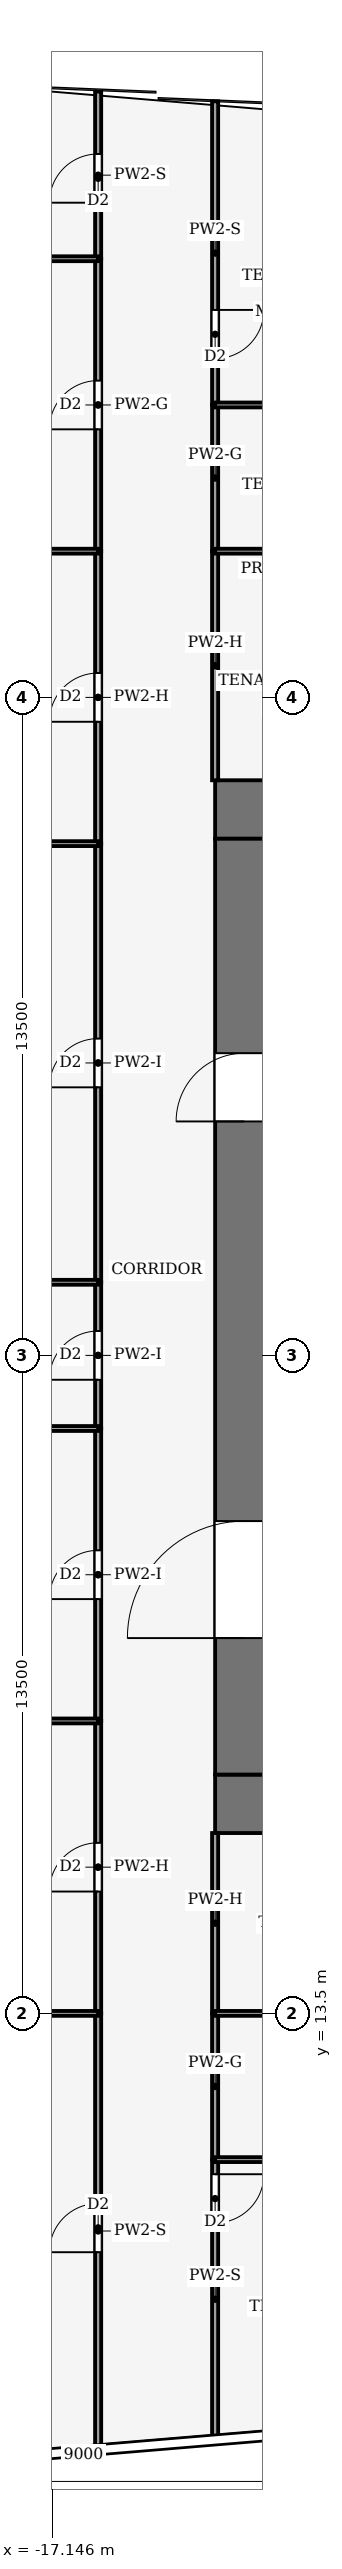
"""IFC4 building model, lengths in metres.
Left out: names, types, materials, properties, quantities, classifications, styles, units other than length and angle.
Written with IfcOpenShell. Run it as: python <this file> out.ifc"""

import sys

from ifc_helpers import new_model, si_unit, direction, frame, frame_2d, origin, place, context, subcontext, project, spatial, rectangle, extrude, element, fill, save


model = new_model("IFC4")
c1 = context("Model", 3, precision=1e-05, world=origin(), true_north=direction((0.0, 1.0)))
c2 = subcontext(c1, "Body", "Model", "MODEL_VIEW")
j1 = project(units=[si_unit("LENGTHUNIT", "METRE"), si_unit("PLANEANGLEUNIT", "RADIAN")], contexts=[c1])
p1 = place(None, origin())
s1 = spatial("IfcSite", under=j1, at=p1, CompositionType="ELEMENT")
p2 = place(p1, origin())
s2 = spatial("IfcBuilding", under=s1, at=p2, CompositionType="ELEMENT")
p3 = place(p2, frame((0.0, 0.0, 78.0)))
s3 = spatial("IfcBuildingStorey", under=s2, at=p3, CompositionType="ELEMENT", Elevation=78.0)
for number, where, z_axis, x_axis in (
    (1, (-13.8, 17.8, -0.13), (0.0, 0.0, 1.0), (1.0, 0.0, 0.0)),
    (2, (-13.8, 38.2, -0.13), (0.0, 0.0, 1.0), (1.0, 0.0, 0.0)),
):
    element("IfcWall", number, at=place(p3, frame(where, z_axis=z_axis, x_axis=x_axis)), inside=s3, PredefinedType="SHEAR", context=c2, shape_type="SweptSolid", body=[
        extrude(rectangle(XDim=27.6, YDim=1.2, at=frame_2d((13.8, 0.0))), origin(), (0.0, 0.0, 1.0), 4.0),
    ])
p4 = place(p3, frame((-13.2, 18.4, -0.13), z_axis=(0.0, 0.0, 1.0), x_axis=(0.0, 1.0, 0.0)))
e3 = element("IfcWall", 3, at=p4, inside=s3, PredefinedType="SHEAR", context=c2, shape_type="SweptSolid", body=[
    extrude(rectangle(XDim=19.2, YDim=1.2, at=frame_2d((9.6, 0.0))), origin(), (0.0, 0.0, 1.0), 4.0),
])
p5 = place(p4, frame((2.8, 0.0, 0.13)))
e4 = element("IfcOpeningElement", 4, at=p5, cuts=e3, PredefinedType="OPENING", context=c2, shape_type="SweptSolid", body=[
    extrude(rectangle(XDim=2.4, YDim=2.4, at=frame_2d((1.2, 1.2))), frame((0.0, 0.61, 0.0), z_axis=(0.0, -1.0, 0.0), x_axis=(1.0, 0.0, 0.0)), (0.0, 0.0, 1.0), 1.22),
])
p6 = place(p4, frame((13.4, 0.0, 0.13)))
e5 = element("IfcOpeningElement", 5, at=p6, cuts=e3, PredefinedType="OPENING", context=c2, shape_type="SweptSolid", body=[
    extrude(rectangle(XDim=1.4, YDim=2.2, at=frame_2d((0.7, 1.1))), frame((0.0, 0.61, 0.0), z_axis=(0.0, -1.0, 0.0), x_axis=(1.0, 0.0, 0.0)), (0.0, 0.0, 1.0), 1.22),
])
p7 = place(p3, frame((-16.2, 4.57, 0.0), z_axis=(0.0, 0.0, 1.0), x_axis=(0.0, 1.0, 0.0)))
e6 = element("IfcWall", 6, at=p7, inside=s3, PredefinedType="PARTITIONING", context=c2, shape_type="SweptSolid", body=[
    extrude(rectangle(XDim=8.93, YDim=0.125, at=frame_2d((4.465, 0.0))), origin(), (0.0, 0.0, 1.0), 3.04),
])
p8 = place(p7, frame((4.03, 0.0, 0.0)))
e7 = element("IfcOpeningElement", 7, at=p8, cuts=e6, PredefinedType="OPENING", context=c2, shape_type="SweptSolid", body=[
    extrude(rectangle(XDim=1.0, YDim=2.1, at=frame_2d((0.5, 1.05))), frame((0.0, 0.073, 0.0), z_axis=(0.0, -1.0, 0.0), x_axis=(1.0, 0.0, 0.0)), (0.0, 0.0, 1.0), 0.145),
])
p9 = place(p3, frame((-16.2, 13.5, 0.0), z_axis=(0.0, 0.0, 1.0), x_axis=(0.0, 1.0, 0.0)))
e8 = element("IfcWall", 8, at=p9, inside=s3, PredefinedType="PARTITIONING", context=c2, shape_type="SweptSolid", body=[
    extrude(rectangle(XDim=6.0, YDim=0.125, at=frame_2d((3.0, 0.0))), origin(), (0.0, 0.0, 1.0), 3.14),
])
p10 = place(p9, frame((2.5, 0.0, 0.0)))
e9 = element("IfcOpeningElement", 9, at=p10, cuts=e8, PredefinedType="OPENING", context=c2, shape_type="SweptSolid", body=[
    extrude(rectangle(XDim=1.0, YDim=2.1, at=frame_2d((0.5, 1.05))), frame((0.0, 0.073, 0.0), z_axis=(0.0, -1.0, 0.0), x_axis=(1.0, 0.0, 0.0)), (0.0, 0.0, 1.0), 0.145),
])
p11 = place(p3, frame((-16.2, 19.5, 0.0), z_axis=(0.0, 0.0, 1.0), x_axis=(0.0, 1.0, 0.0)))
e10 = element("IfcWall", 10, at=p11, inside=s3, PredefinedType="PARTITIONING", context=c2, shape_type="SweptSolid", body=[
    extrude(rectangle(XDim=6.0, YDim=0.125, at=frame_2d((3.0, 0.0))), origin(), (0.0, 0.0, 1.0), 3.48),
])
p12 = place(p11, frame((2.5, 0.0, 0.0)))
e11 = element("IfcOpeningElement", 11, at=p12, cuts=e10, PredefinedType="OPENING", context=c2, shape_type="SweptSolid", body=[
    extrude(rectangle(XDim=1.0, YDim=2.1, at=frame_2d((0.5, 1.05))), frame((0.0, 0.073, 0.0), z_axis=(0.0, -1.0, 0.0), x_axis=(1.0, 0.0, 0.0)), (0.0, 0.0, 1.0), 0.145),
])
p13 = place(p3, frame((-16.2, 25.5, 0.0), z_axis=(0.0, 0.0, 1.0), x_axis=(0.0, 1.0, 0.0)))
e12 = element("IfcWall", 12, at=p13, inside=s3, PredefinedType="PARTITIONING", context=c2, shape_type="SweptSolid", body=[
    extrude(rectangle(XDim=3.0, YDim=0.125, at=frame_2d((1.5, 0.0))), origin(), (0.0, 0.0, 1.0), 3.48),
])
p14 = place(p13, frame((1.0, 0.0, 0.0)))
e13 = element("IfcOpeningElement", 13, at=p14, cuts=e12, PredefinedType="OPENING", context=c2, shape_type="SweptSolid", body=[
    extrude(rectangle(XDim=1.0, YDim=2.1, at=frame_2d((0.5, 1.05))), frame((0.0, 0.073, 0.0), z_axis=(0.0, -1.0, 0.0), x_axis=(1.0, 0.0, 0.0)), (0.0, 0.0, 1.0), 0.145),
])
p15 = place(p3, frame((-16.2, 28.5, 0.0), z_axis=(0.0, 0.0, 1.0), x_axis=(0.0, 1.0, 0.0)))
e14 = element("IfcWall", 14, at=p15, inside=s3, PredefinedType="PARTITIONING", context=c2, shape_type="SweptSolid", body=[
    extrude(rectangle(XDim=9.0, YDim=0.125, at=frame_2d((4.5, 0.0))), origin(), (0.0, 0.0, 1.0), 3.48),
])
p16 = place(p15, frame((4.0, 0.0, 0.0)))
e15 = element("IfcOpeningElement", 15, at=p16, cuts=e14, PredefinedType="OPENING", context=c2, shape_type="SweptSolid", body=[
    extrude(rectangle(XDim=1.0, YDim=2.1, at=frame_2d((0.5, 1.05))), frame((0.0, 0.073, 0.0), z_axis=(0.0, -1.0, 0.0), x_axis=(1.0, 0.0, 0.0)), (0.0, 0.0, 1.0), 0.145),
])
p17 = place(p3, frame((-16.2, 37.5, 0.0), z_axis=(0.0, 0.0, 1.0), x_axis=(0.0, 1.0, 0.0)))
e16 = element("IfcWall", 16, at=p17, inside=s3, PredefinedType="PARTITIONING", context=c2, shape_type="SweptSolid", body=[
    extrude(rectangle(XDim=6.0, YDim=0.125, at=frame_2d((3.0, 0.0))), origin(), (0.0, 0.0, 1.0), 3.14),
])
p18 = place(p17, frame((2.5, 0.0, 0.0)))
e17 = element("IfcOpeningElement", 17, at=p18, cuts=e16, PredefinedType="OPENING", context=c2, shape_type="SweptSolid", body=[
    extrude(rectangle(XDim=1.0, YDim=2.1, at=frame_2d((0.5, 1.05))), frame((0.0, 0.073, 0.0), z_axis=(0.0, -1.0, 0.0), x_axis=(1.0, 0.0, 0.0)), (0.0, 0.0, 1.0), 0.145),
])
p19 = place(p3, frame((-16.2, 43.5, 0.0), z_axis=(0.0, 0.0, 1.0), x_axis=(0.0, 1.0, 0.0)))
e18 = element("IfcWall", 18, at=p19, inside=s3, PredefinedType="PARTITIONING", context=c2, shape_type="SweptSolid", body=[
    extrude(rectangle(XDim=6.0, YDim=0.125, at=frame_2d((3.0, 0.0))), origin(), (0.0, 0.0, 1.0), 3.87),
])
p20 = place(p19, frame((2.5, 0.0, 0.0)))
e19 = element("IfcOpeningElement", 19, at=p20, cuts=e18, PredefinedType="OPENING", context=c2, shape_type="SweptSolid", body=[
    extrude(rectangle(XDim=1.0, YDim=2.1, at=frame_2d((0.5, 1.05))), frame((0.0, 0.073, 0.0), z_axis=(0.0, -1.0, 0.0), x_axis=(1.0, 0.0, 0.0)), (0.0, 0.0, 1.0), 0.145),
])
p21 = place(p3, frame((-16.2, 49.5, 0.0), z_axis=(0.0, 0.0, 1.0), x_axis=(0.0, 1.0, 0.0)))
e20 = element("IfcWall", 20, at=p21, inside=s3, PredefinedType="PARTITIONING", context=c2, shape_type="SweptSolid", body=[
    extrude(rectangle(XDim=3.43, YDim=0.125, at=frame_2d((1.715, 0.0))), origin(), (0.0, 0.0, 1.0), 3.04),
])
p22 = place(p21, frame((1.15, 0.0, 0.0)))
e21 = element("IfcOpeningElement", 21, at=p22, cuts=e20, PredefinedType="OPENING", context=c2, shape_type="SweptSolid", body=[
    extrude(rectangle(XDim=1.0, YDim=2.1, at=frame_2d((0.5, 1.05))), frame((0.0, 0.073, 0.0), z_axis=(0.0, -1.0, 0.0), x_axis=(1.0, 0.0, 0.0)), (0.0, 0.0, 1.0), 0.145),
])
p23 = place(p3, frame((-13.8, 10.5, 0.0), z_axis=(0.0, 0.0, 1.0), x_axis=(0.0, -1.0, 0.0)))
e22 = element("IfcWall", 22, at=p23, inside=s3, PredefinedType="PARTITIONING", context=c2, shape_type="SweptSolid", body=[
    extrude(rectangle(XDim=5.73, YDim=0.125, at=frame_2d((2.865, 0.0))), origin(), (0.0, 0.0, 1.0), 3.04),
])
p24 = place(p23, frame((0.3, 0.0, 0.0)))
e23 = element("IfcOpeningElement", 23, at=p24, cuts=e22, PredefinedType="OPENING", context=c2, shape_type="SweptSolid", body=[
    extrude(rectangle(XDim=1.0, YDim=2.1, at=frame_2d((0.5, 1.05))), frame((0.0, 0.073, 0.0), z_axis=(0.0, -1.0, 0.0), x_axis=(1.0, 0.0, 0.0)), (0.0, 0.0, 1.0), 0.145),
])
p25 = place(p3, frame((-13.8, 10.5, 0.0), z_axis=(0.0, 0.0, 1.0), x_axis=(0.0, 1.0, 0.0)))
e24 = element("IfcWall", 24, at=p25, inside=s3, PredefinedType="PARTITIONING", context=c2, shape_type="SweptSolid", body=[
    extrude(rectangle(XDim=3.0, YDim=0.125, at=frame_2d((1.5, 0.0))), origin(), (0.0, 0.0, 1.0), 3.87),
])
p26 = place(p3, frame((-13.8, 13.5, 0.0), z_axis=(0.0, 0.0, 1.0), x_axis=(0.0, 1.0, 0.0)))
e25 = element("IfcWall", 25, at=p26, inside=s3, PredefinedType="PARTITIONING", context=c2, shape_type="SweptSolid", body=[
    extrude(rectangle(XDim=3.7, YDim=0.125, at=frame_2d((1.85, 0.0))), origin(), (0.0, 0.0, 1.0), 3.14),
])
p27 = place(p3, frame((-13.8, 38.8, 0.0), z_axis=(0.0, 0.0, 1.0), x_axis=(0.0, 1.0, 0.0)))
e26 = element("IfcWall", 26, at=p27, inside=s3, PredefinedType="PARTITIONING", context=c2, shape_type="SweptSolid", body=[
    extrude(rectangle(XDim=4.7, YDim=0.125, at=frame_2d((2.35, 0.0))), origin(), (0.0, 0.0, 1.0), 3.14),
])
p28 = place(p3, frame((-13.8, 43.5, 0.0), z_axis=(0.0, 0.0, 1.0), x_axis=(0.0, 1.0, 0.0)))
e27 = element("IfcWall", 27, at=p28, inside=s3, PredefinedType="PARTITIONING", context=c2, shape_type="SweptSolid", body=[
    extrude(rectangle(XDim=3.0, YDim=0.125, at=frame_2d((1.5, 0.0))), origin(), (0.0, 0.0, 1.0), 3.87),
])
p29 = place(p3, frame((-13.8, 52.73, 0.0), z_axis=(0.0, 0.0, 1.0), x_axis=(0.0, -1.0, 0.0)))
e28 = element("IfcWall", 28, at=p29, inside=s3, PredefinedType="PARTITIONING", context=c2, shape_type="SweptSolid", body=[
    extrude(rectangle(XDim=6.23, YDim=0.125, at=frame_2d((3.115, 0.0))), origin(), (0.0, 0.0, 1.0), 3.04),
])
p30 = place(p29, frame((4.28, 0.0, 0.0)))
e29 = element("IfcOpeningElement", 29, at=p30, cuts=e28, PredefinedType="OPENING", context=c2, shape_type="SweptSolid", body=[
    extrude(rectangle(XDim=1.0, YDim=2.1, at=frame_2d((0.5, 1.05))), frame((0.0, 0.073, 0.0), z_axis=(0.0, -1.0, 0.0), x_axis=(1.0, 0.0, 0.0)), (0.0, 0.0, 1.0), 0.145),
])
p31 = place(p3, frame((-16.2, 13.5, 0.0), z_axis=(0.0, 0.0, 1.0), x_axis=(-1.0, 0.0, 0.0)))
e30 = element("IfcWall", 30, at=p31, inside=s3, PredefinedType="PARTITIONING", context=c2, shape_type="SweptSolid", body=[
    extrude(rectangle(XDim=7.634, YDim=0.1, at=frame_2d((3.817, 0.0))), origin(), (0.0, 0.0, 1.0), 3.04),
])
p32 = place(p3, frame((-16.2, 19.5, 0.0), z_axis=(0.0, 0.0, 1.0), x_axis=(-1.0, 0.0, 0.0)))
e31 = element("IfcWall", 31, at=p32, inside=s3, PredefinedType="PARTITIONING", context=c2, shape_type="SweptSolid", body=[
    extrude(rectangle(XDim=7.14, YDim=0.1, at=frame_2d((3.57, 0.0))), origin(), (0.0, 0.0, 1.0), 3.04),
])
p33 = place(p3, frame((-16.2, 25.5, 0.0), z_axis=(0.0, 0.0, 1.0), x_axis=(-1.0, 0.0, 0.0)))
e32 = element("IfcWall", 32, at=p33, inside=s3, PredefinedType="PARTITIONING", context=c2, shape_type="SweptSolid", body=[
    extrude(rectangle(XDim=6.647, YDim=0.1, at=frame_2d((3.324, 0.0))), origin(), (0.0, 0.0, 1.0), 3.04),
])
p34 = place(p3, frame((-16.2, 28.5, 0.0), z_axis=(0.0, 0.0, 1.0), x_axis=(-1.0, 0.0, 0.0)))
e33 = element("IfcWall", 33, at=p34, inside=s3, PredefinedType="PARTITIONING", context=c2, shape_type="SweptSolid", body=[
    extrude(rectangle(XDim=6.401, YDim=0.1, at=frame_2d((3.2, 0.0))), origin(), (0.0, 0.0, 1.0), 3.04),
])
p35 = place(p3, frame((-16.2, 37.5, 0.0), z_axis=(0.0, 0.0, 1.0), x_axis=(-1.0, 0.0, 0.0)))
e34 = element("IfcWall", 34, at=p35, inside=s3, PredefinedType="PARTITIONING", context=c2, shape_type="SweptSolid", body=[
    extrude(rectangle(XDim=7.099, YDim=0.1, at=frame_2d((3.55, 0.0))), origin(), (0.0, 0.0, 1.0), 3.04),
])
p36 = place(p3, frame((-16.2, 43.5, 0.0), z_axis=(0.0, 0.0, 1.0), x_axis=(-1.0, 0.0, 0.0)))
e35 = element("IfcWall", 35, at=p36, inside=s3, PredefinedType="PARTITIONING", context=c2, shape_type="SweptSolid", body=[
    extrude(rectangle(XDim=7.592, YDim=0.1, at=frame_2d((3.796, 0.0))), origin(), (0.0, 0.0, 1.0), 3.04),
])
p37 = place(p3, frame((-16.2, 49.5, 0.0), z_axis=(0.0, 0.0, 1.0), x_axis=(-1.0, 0.0, 0.0)))
e36 = element("IfcWall", 36, at=p37, inside=s3, PredefinedType="PARTITIONING", context=c2, shape_type="SweptSolid", body=[
    extrude(rectangle(XDim=7.287, YDim=0.1, at=frame_2d((3.644, 0.0))), origin(), (0.0, 0.0, 1.0), 3.34),
])
p38 = place(p3, frame((-13.8, 10.5, 0.0), z_axis=(0.0, 0.0, 1.0), x_axis=(1.0, 0.0, 0.0)))
e37 = element("IfcWall", 37, at=p38, inside=s3, PredefinedType="PARTITIONING", context=c2, shape_type="SweptSolid", body=[
    extrude(rectangle(XDim=6.3, YDim=0.1, at=frame_2d((3.15, 0.0))), origin(), (0.0, 0.0, 1.0), 3.39),
])
p39 = place(p38, frame((2.65, 0.0, 0.0)))
e38 = element("IfcOpeningElement", 38, at=p39, cuts=e37, PredefinedType="OPENING", context=c2, shape_type="SweptSolid", body=[
    extrude(rectangle(XDim=1.0, YDim=2.1, at=frame_2d((0.5, 1.05))), frame((0.0, 0.06, 0.0), z_axis=(0.0, -1.0, 0.0), x_axis=(1.0, 0.0, 0.0)), (0.0, 0.0, 1.0), 0.12),
])
p40 = place(p3, frame((-13.8, 13.5, 0.0), z_axis=(0.0, 0.0, 1.0), x_axis=(1.0, 0.0, 0.0)))
e39 = element("IfcWall", 39, at=p40, inside=s3, PredefinedType="PARTITIONING", context=c2, shape_type="SweptSolid", body=[
    extrude(rectangle(XDim=6.3, YDim=0.1, at=frame_2d((3.15, 0.0))), origin(), (0.0, 0.0, 1.0), 3.39),
])
p41 = place(p40, frame((2.65, 0.0, 0.0)))
e40 = element("IfcOpeningElement", 40, at=p41, cuts=e39, PredefinedType="OPENING", context=c2, shape_type="SweptSolid", body=[
    extrude(rectangle(XDim=1.0, YDim=2.1, at=frame_2d((0.5, 1.05))), frame((0.0, 0.06, 0.0), z_axis=(0.0, -1.0, 0.0), x_axis=(1.0, 0.0, 0.0)), (0.0, 0.0, 1.0), 0.12),
])
p42 = place(p3, frame((-10.5, 43.5, 0.0), z_axis=(0.0, 0.0, 1.0), x_axis=(-1.0, 0.0, 0.0)))
e41 = element("IfcWall", 41, at=p42, inside=s3, PredefinedType="PARTITIONING", context=c2, shape_type="SweptSolid", body=[
    extrude(rectangle(XDim=3.3, YDim=0.1, at=frame_2d((1.65, 0.0))), origin(), (0.0, 0.0, 1.0), 3.39),
])
p43 = place(p3, frame((-10.5, 46.5, 0.0), z_axis=(0.0, 0.0, 1.0), x_axis=(-1.0, 0.0, 0.0)))
e42 = element("IfcWall", 42, at=p43, inside=s3, PredefinedType="PARTITIONING", context=c2, shape_type="SweptSolid", body=[
    extrude(rectangle(XDim=3.3, YDim=0.1, at=frame_2d((1.65, 0.0))), origin(), (0.0, 0.0, 1.0), 3.39),
])
p44 = place(p43, frame((0.35, 0.0, 0.0)))
e43 = element("IfcOpeningElement", 43, at=p44, cuts=e42, PredefinedType="OPENING", context=c2, shape_type="SweptSolid", body=[
    extrude(rectangle(XDim=1.0, YDim=2.1, at=frame_2d((0.5, 1.05))), frame((0.0, 0.06, 0.0), z_axis=(0.0, -1.0, 0.0), x_axis=(1.0, 0.0, 0.0)), (0.0, 0.0, 1.0), 0.12),
])
p45 = place(p5, origin())
e44 = element("IfcDoor", 44, at=p45, inside=s3, OperationType="DOUBLE_DOOR_SINGLE_SWING", PredefinedType="DOOR", context=c2, shape_type="SweptSolid", body=[
    extrude(rectangle(XDim=2.4, YDim=2.4, at=frame_2d((1.2, 1.2))), frame((0.0, 0.025, 0.0), z_axis=(0.0, -1.0, 0.0), x_axis=(1.0, 0.0, 0.0)), (0.0, 0.0, 1.0), 0.05),
])
fill(e4, e44)
p46 = place(p6, origin())
e45 = element("IfcDoor", 45, at=p46, inside=s3, OperationType="SINGLE_SWING_RIGHT", PredefinedType="DOOR", context=c2, shape_type="SweptSolid", body=[
    extrude(rectangle(XDim=1.4, YDim=2.2, at=frame_2d((0.7, 1.1))), frame((0.0, 0.025, 0.0), z_axis=(0.0, -1.0, 0.0), x_axis=(1.0, 0.0, 0.0)), (0.0, 0.0, 1.0), 0.05),
])
fill(e5, e45)
p47 = place(p8, origin())
e46 = element("IfcDoor", 46, at=p47, inside=s3, OperationType="SINGLE_SWING_RIGHT", PredefinedType="DOOR", context=c2, shape_type="SweptSolid", body=[
    extrude(rectangle(XDim=1.0, YDim=2.1, at=frame_2d((0.5, 1.05))), frame((0.0, 0.025, 0.0), z_axis=(0.0, -1.0, 0.0), x_axis=(1.0, 0.0, 0.0)), (0.0, 0.0, 1.0), 0.05),
])
fill(e7, e46)
p48 = place(p10, origin())
e47 = element("IfcDoor", 47, at=p48, inside=s3, OperationType="SINGLE_SWING_RIGHT", PredefinedType="DOOR", context=c2, shape_type="SweptSolid", body=[
    extrude(rectangle(XDim=1.0, YDim=2.1, at=frame_2d((0.5, 1.05))), frame((0.0, 0.025, 0.0), z_axis=(0.0, -1.0, 0.0), x_axis=(1.0, 0.0, 0.0)), (0.0, 0.0, 1.0), 0.05),
])
fill(e9, e47)
p49 = place(p12, origin())
e48 = element("IfcDoor", 48, at=p49, inside=s3, OperationType="SINGLE_SWING_LEFT", PredefinedType="DOOR", context=c2, shape_type="SweptSolid", body=[
    extrude(rectangle(XDim=1.0, YDim=2.1, at=frame_2d((0.5, 1.05))), frame((0.0, 0.025, 0.0), z_axis=(0.0, -1.0, 0.0), x_axis=(1.0, 0.0, 0.0)), (0.0, 0.0, 1.0), 0.05),
])
fill(e11, e48)
p50 = place(p14, origin())
e49 = element("IfcDoor", 49, at=p50, inside=s3, OperationType="SINGLE_SWING_RIGHT", PredefinedType="DOOR", context=c2, shape_type="SweptSolid", body=[
    extrude(rectangle(XDim=1.0, YDim=2.1, at=frame_2d((0.5, 1.05))), frame((0.0, 0.025, 0.0), z_axis=(0.0, -1.0, 0.0), x_axis=(1.0, 0.0, 0.0)), (0.0, 0.0, 1.0), 0.05),
])
fill(e13, e49)
p51 = place(p16, origin())
e50 = element("IfcDoor", 50, at=p51, inside=s3, OperationType="SINGLE_SWING_LEFT", PredefinedType="DOOR", context=c2, shape_type="SweptSolid", body=[
    extrude(rectangle(XDim=1.0, YDim=2.1, at=frame_2d((0.5, 1.05))), frame((0.0, 0.025, 0.0), z_axis=(0.0, -1.0, 0.0), x_axis=(1.0, 0.0, 0.0)), (0.0, 0.0, 1.0), 0.05),
])
fill(e15, e50)
p52 = place(p18, origin())
e51 = element("IfcDoor", 51, at=p52, inside=s3, OperationType="SINGLE_SWING_RIGHT", PredefinedType="DOOR", context=c2, shape_type="SweptSolid", body=[
    extrude(rectangle(XDim=1.0, YDim=2.1, at=frame_2d((0.5, 1.05))), frame((0.0, 0.025, 0.0), z_axis=(0.0, -1.0, 0.0), x_axis=(1.0, 0.0, 0.0)), (0.0, 0.0, 1.0), 0.05),
])
fill(e17, e51)
p53 = place(p20, origin())
e52 = element("IfcDoor", 52, at=p53, inside=s3, OperationType="SINGLE_SWING_LEFT", PredefinedType="DOOR", context=c2, shape_type="SweptSolid", body=[
    extrude(rectangle(XDim=1.0, YDim=2.1, at=frame_2d((0.5, 1.05))), frame((0.0, 0.025, 0.0), z_axis=(0.0, -1.0, 0.0), x_axis=(1.0, 0.0, 0.0)), (0.0, 0.0, 1.0), 0.05),
])
fill(e19, e52)
p54 = place(p22, origin())
e53 = element("IfcDoor", 53, at=p54, inside=s3, OperationType="SINGLE_SWING_LEFT", PredefinedType="DOOR", context=c2, shape_type="SweptSolid", body=[
    extrude(rectangle(XDim=1.0, YDim=2.1, at=frame_2d((0.5, 1.05))), frame((0.0, 0.025, 0.0), z_axis=(0.0, -1.0, 0.0), x_axis=(1.0, 0.0, 0.0)), (0.0, 0.0, 1.0), 0.05),
])
fill(e21, e53)
p55 = place(p24, origin())
e54 = element("IfcDoor", 54, at=p55, inside=s3, OperationType="SINGLE_SWING_LEFT", PredefinedType="DOOR", context=c2, shape_type="SweptSolid", body=[
    extrude(rectangle(XDim=1.0, YDim=2.1, at=frame_2d((0.5, 1.05))), frame((0.0, 0.025, 0.0), z_axis=(0.0, -1.0, 0.0), x_axis=(1.0, 0.0, 0.0)), (0.0, 0.0, 1.0), 0.05),
])
fill(e23, e54)
p56 = place(p30, origin())
e55 = element("IfcDoor", 55, at=p56, inside=s3, OperationType="SINGLE_SWING_RIGHT", PredefinedType="DOOR", context=c2, shape_type="SweptSolid", body=[
    extrude(rectangle(XDim=1.0, YDim=2.1, at=frame_2d((0.5, 1.05))), frame((0.0, 0.025, 0.0), z_axis=(0.0, -1.0, 0.0), x_axis=(1.0, 0.0, 0.0)), (0.0, 0.0, 1.0), 0.05),
])
fill(e29, e55)
save(model, sys.argv[1])
